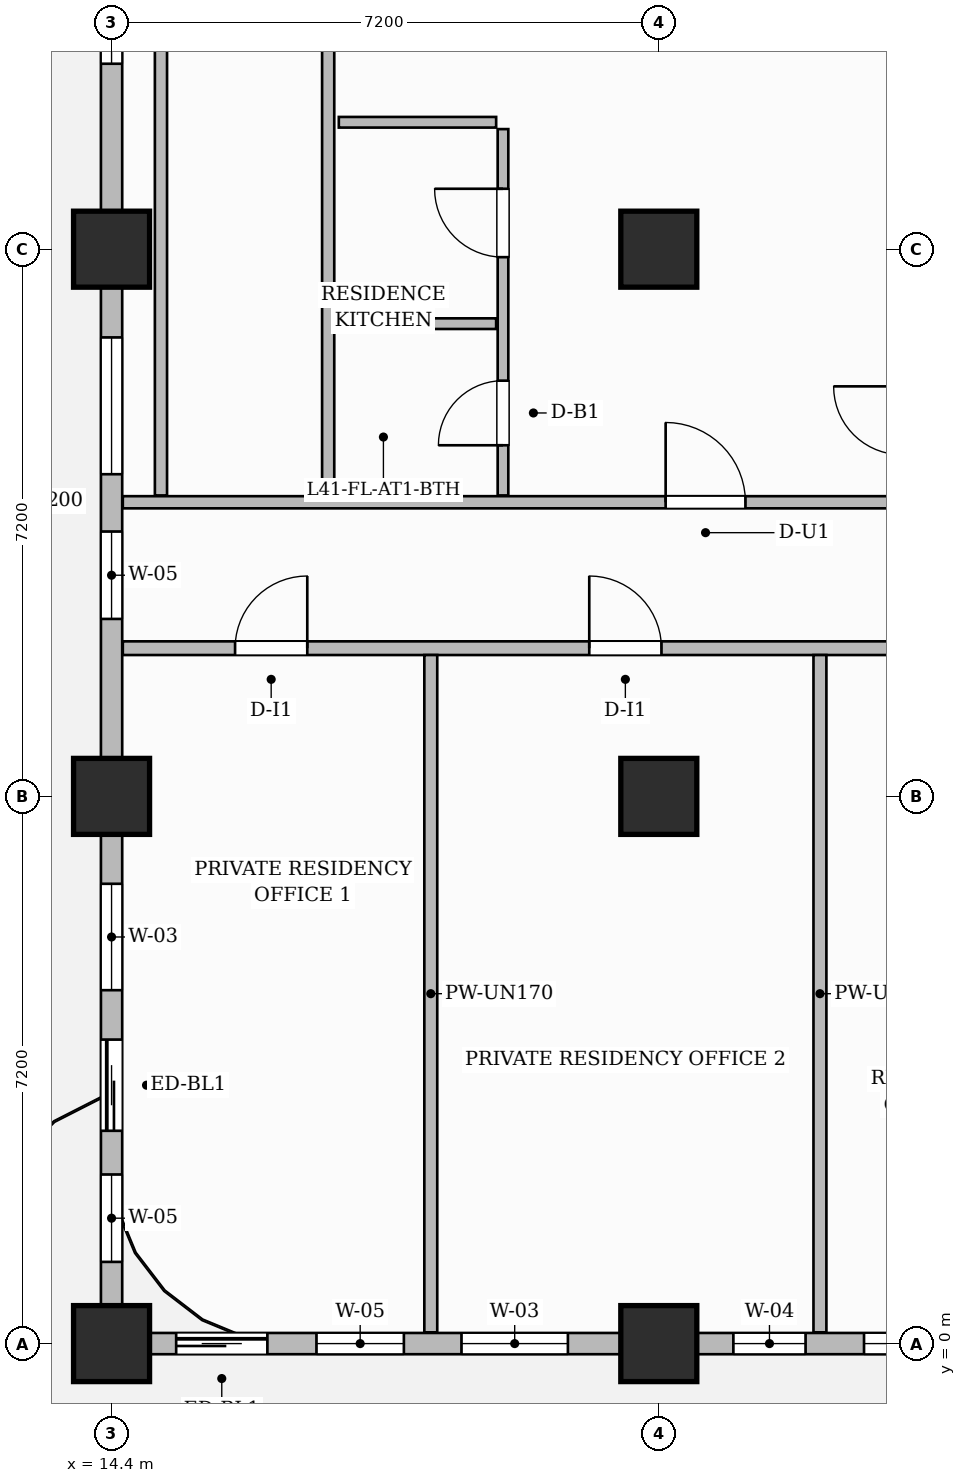
"""IFC4 building model, lengths in metres.
Left out: names, types, materials, properties, quantities, classifications, styles, units other than length and angle.
Written with IfcOpenShell. Run it as: python <this file> out.ifc"""

import sys

from ifc_helpers import new_model, si_unit, direction, frame, frame_2d, origin, origin_2d, place, context, subcontext, project, spatial, rectangle, extrude, source, transform, mapped, element, fill, save


model = new_model("IFC4")
c1 = context("Model", 3, precision=1e-05, world=origin(), true_north=direction((0.0, 1.0)))
c2 = subcontext(c1, "Body", "Model", "MODEL_VIEW")
j1 = project(units=[si_unit("LENGTHUNIT", "METRE"), si_unit("PLANEANGLEUNIT", "RADIAN")], contexts=[c1])
p1 = place(None, origin())
s1 = spatial("IfcSite", under=j1, at=p1, CompositionType="ELEMENT")
p2 = place(p1, origin())
s2 = spatial("IfcBuilding", under=s1, at=p2, CompositionType="ELEMENT")
p3 = place(p2, frame((0.0, 0.0, 165.7)))
s3 = spatial("IfcBuildingStorey", under=s2, at=p3, CompositionType="ELEMENT", Elevation=165.7)
m1 = source(origin(), c2, "Body", "SweptSolid", [
    extrude(rectangle(XDim=1.0, YDim=1.0, at=origin_2d()), origin(), (0.0, 0.0, 1.0), 3.85),
])
for number, where, z_axis, x_axis in (
    (1, (14.4, 0.0, 0.0), (0.0, 0.0, 1.0), (1.0, 0.0, 0.0)),
    (2, (14.4, 7.2, 0.0), (0.0, 0.0, 1.0), (1.0, 0.0, 0.0)),
    (3, (14.4, 14.4, 0.0), (0.0, 0.0, 1.0), (1.0, 0.0, 0.0)),
    (4, (21.6, 0.0, 0.0), (0.0, 0.0, 1.0), (1.0, 0.0, 0.0)),
    (5, (21.6, 7.2, 0.0), (0.0, 0.0, 1.0), (1.0, 0.0, 0.0)),
    (6, (21.6, 14.4, 0.0), (0.0, 0.0, 1.0), (1.0, 0.0, 0.0)),
):
    element("IfcColumn", number, at=place(p3, frame(where, z_axis=z_axis, x_axis=x_axis)), inside=s3, PredefinedType="COLUMN", context=c2, shape_type="MappedRepresentation", body=[
        mapped(m1, transform((0.0, 0.0, 0.0), scale=1.0)),
    ])
p4 = place(p3, frame((14.548, 9.15, 0.0), z_axis=(0.0, 0.0, 1.0), x_axis=(1.0, 0.0, 0.0)))
e7 = element("IfcWall", 7, at=p4, inside=s3, PredefinedType="PARTITIONING", context=c2, shape_type="SweptSolid", body=[
    extrude(rectangle(XDim=15.562, YDim=0.18, at=frame_2d((7.781, 0.0))), origin(), (0.0, 0.0, 1.0), 3.6),
])
p5 = place(p4, frame((1.477, 0.0, 0.0)))
e8 = element("IfcOpeningElement", 8, at=p5, cuts=e7, PredefinedType="OPENING", context=c2, shape_type="SweptSolid", body=[
    extrude(rectangle(XDim=0.95, YDim=2.15, at=frame_2d((0.475, 1.075))), frame((0.0, 0.1, 0.0), z_axis=(0.0, -1.0, 0.0), x_axis=(1.0, 0.0, 0.0)), (0.0, 0.0, 1.0), 0.2),
])
p6 = place(p4, frame((6.137, 0.0, 0.0)))
e9 = element("IfcOpeningElement", 9, at=p6, cuts=e7, PredefinedType="OPENING", context=c2, shape_type="SweptSolid", body=[
    extrude(rectangle(XDim=0.95, YDim=2.15, at=frame_2d((0.475, 1.075))), frame((0.0, 0.1, 0.0), z_axis=(0.0, -1.0, 0.0), x_axis=(1.0, 0.0, 0.0)), (0.0, 0.0, 1.0), 0.2),
])
p7 = place(p4, frame((10.177, 0.0, 0.0)))
e10 = element("IfcOpeningElement", 10, at=p7, cuts=e7, PredefinedType="OPENING", context=c2, shape_type="SweptSolid", body=[
    extrude(rectangle(XDim=0.95, YDim=2.15, at=frame_2d((0.475, 1.075))), frame((0.0, 0.1, 0.0), z_axis=(0.0, -1.0, 0.0), x_axis=(1.0, 0.0, 0.0)), (0.0, 0.0, 1.0), 0.2),
])
p8 = place(p4, frame((13.417, 0.0, 0.0)))
e11 = element("IfcOpeningElement", 11, at=p8, cuts=e7, PredefinedType="OPENING", context=c2, shape_type="SweptSolid", body=[
    extrude(rectangle(XDim=0.95, YDim=2.15, at=frame_2d((0.475, 1.075))), frame((0.0, 0.1, 0.0), z_axis=(0.0, -1.0, 0.0), x_axis=(1.0, 0.0, 0.0)), (0.0, 0.0, 1.0), 0.2),
])
p9 = place(p3, frame((14.548, 11.07, 0.0), z_axis=(0.0, 0.0, 1.0), x_axis=(1.0, 0.0, 0.0)))
e12 = element("IfcWall", 12, at=p9, inside=s3, PredefinedType="PARTITIONING", context=c2, shape_type="SweptSolid", body=[
    extrude(rectangle(XDim=15.562, YDim=0.16, at=frame_2d((7.781, 0.0))), origin(), (0.0, 0.0, 1.0), 3.6),
])
p10 = place(p9, frame((7.142, 0.0, 0.0)))
e13 = element("IfcOpeningElement", 13, at=p10, cuts=e12, PredefinedType="OPENING", context=c2, shape_type="SweptSolid", body=[
    extrude(rectangle(XDim=1.05, YDim=2.25, at=frame_2d((0.525, 1.125))), frame((0.0, 0.09, 0.0), z_axis=(0.0, -1.0, 0.0), x_axis=(1.0, 0.0, 0.0)), (0.0, 0.0, 1.0), 0.18),
])
for number, where, z_axis, x_axis in (
    (14, (18.6, 0.148, 0.0), (0.0, 0.0, 1.0), (0.0, 1.0, 0.0)),
    (15, (23.72, 0.148, 0.0), (0.0, 0.0, 1.0), (0.0, 1.0, 0.0)),
):
    element("IfcWall", number, at=place(p3, frame(where, z_axis=z_axis, x_axis=x_axis)), inside=s3, PredefinedType="PARTITIONING", context=c2, shape_type="SweptSolid", body=[
        extrude(rectangle(XDim=8.912, YDim=0.17, at=frame_2d((4.456, 0.0))), origin(), (0.0, 0.0, 1.0), 3.6),
    ])
for number, where, z_axis, x_axis in (
    (16, (15.05, 11.16, 0.0), (0.0, 0.0, 1.0), (0.0, 1.0, 0.0)),
    (17, (17.25, 11.16, 0.0), (0.0, 0.0, 1.0), (0.0, 1.0, 0.0)),
):
    element("IfcWall", number, at=place(p3, frame(where, z_axis=z_axis, x_axis=x_axis)), inside=s3, PredefinedType="PARTITIONING", context=c2, shape_type="SweptSolid", body=[
        extrude(rectangle(XDim=13.95, YDim=0.16, at=frame_2d((6.975, 0.0))), origin(), (0.0, 0.0, 1.0), 3.6),
    ])
p11 = place(p3, frame((19.55, 11.16, 0.0), z_axis=(0.0, 0.0, 1.0), x_axis=(0.0, 1.0, 0.0)))
e18 = element("IfcWall", 18, at=p11, inside=s3, PredefinedType="PARTITIONING", context=c2, shape_type="SweptSolid", body=[
    extrude(rectangle(XDim=4.82, YDim=0.14, at=frame_2d((2.41, 0.0))), origin(), (0.0, 0.0, 1.0), 3.6),
])
p12 = place(p11, frame((0.66, 0.0, 0.0)))
e19 = element("IfcOpeningElement", 19, at=p12, cuts=e18, PredefinedType="OPENING", context=c2, shape_type="SweptSolid", body=[
    extrude(rectangle(XDim=0.85, YDim=2.1, at=frame_2d((0.425, 1.05))), frame((0.0, 0.08, 0.0), z_axis=(0.0, -1.0, 0.0), x_axis=(1.0, 0.0, 0.0)), (0.0, 0.0, 1.0), 0.16),
])
p13 = place(p11, frame((3.135, 0.0, 0.0)))
e20 = element("IfcOpeningElement", 20, at=p13, cuts=e18, PredefinedType="OPENING", context=c2, shape_type="SweptSolid", body=[
    extrude(rectangle(XDim=0.9, YDim=2.15, at=frame_2d((0.45, 1.075))), frame((0.0, 0.08, 0.0), z_axis=(0.0, -1.0, 0.0), x_axis=(1.0, 0.0, 0.0)), (0.0, 0.0, 1.0), 0.16),
])
for number, where, z_axis, x_axis in (
    (21, (17.39, 13.42, 0.0), (0.0, 0.0, 1.0), (1.0, 0.0, 0.0)),
    (22, (17.39, 16.07, 0.0), (0.0, 0.0, 1.0), (1.0, 0.0, 0.0)),
):
    element("IfcWall", number, at=place(p3, frame(where, z_axis=z_axis, x_axis=x_axis)), inside=s3, PredefinedType="PARTITIONING", context=c2, shape_type="SweptSolid", body=[
        extrude(rectangle(XDim=2.07, YDim=0.14, at=frame_2d((1.035, 0.0))), origin(), (0.0, 0.0, 1.0), 3.6),
    ])
p14 = place(p3, frame((14.4, 0.0, 0.0), z_axis=(0.0, 0.0, 1.0), x_axis=(1.0, 0.0, 0.0)))
e23 = element("IfcWall", 23, at=p14, inside=s3, PredefinedType="SOLIDWALL", context=c2, shape_type="SweptSolid", body=[
    extrude(rectangle(XDim=35.4, YDim=0.28, at=frame_2d((17.7, 0.0))), origin(), (0.0, 0.0, 1.0), 3.085),
])
p15 = place(p14, frame((0.85, 0.0, 0.0)))
e24 = element("IfcOpeningElement", 24, at=p15, cuts=e23, PredefinedType="OPENING", context=c2, shape_type="SweptSolid", body=[
    extrude(rectangle(XDim=1.2, YDim=2.2, at=frame_2d((0.6, 1.1))), frame((0.0, 0.15, 0.0), z_axis=(0.0, -1.0, 0.0), x_axis=(1.0, 0.0, 0.0)), (0.0, 0.0, 1.0), 0.3),
])
p16 = place(p14, frame((2.696, 0.0, 0.8)))
e25 = element("IfcOpeningElement", 25, at=p16, cuts=e23, PredefinedType="OPENING", context=c2, shape_type="SweptSolid", body=[
    extrude(rectangle(XDim=1.15, YDim=1.8, at=frame_2d((0.575, 0.9))), frame((0.0, 0.15, 0.0), z_axis=(0.0, -1.0, 0.0), x_axis=(1.0, 0.0, 0.0)), (0.0, 0.0, 1.0), 0.3),
])
p17 = place(p14, frame((4.604, 0.0, 0.8)))
e26 = element("IfcOpeningElement", 26, at=p17, cuts=e23, PredefinedType="OPENING", context=c2, shape_type="SweptSolid", body=[
    extrude(rectangle(XDim=1.4, YDim=1.85, at=frame_2d((0.7, 0.925))), frame((0.0, 0.15, 0.0), z_axis=(0.0, -1.0, 0.0), x_axis=(1.0, 0.0, 0.0)), (0.0, 0.0, 1.0), 0.3),
])
p18 = place(p14, frame((8.181, 0.0, 0.8)))
e27 = element("IfcOpeningElement", 27, at=p18, cuts=e23, PredefinedType="OPENING", context=c2, shape_type="SweptSolid", body=[
    extrude(rectangle(XDim=0.95, YDim=1.75, at=frame_2d((0.475, 0.875))), frame((0.0, 0.15, 0.0), z_axis=(0.0, -1.0, 0.0), x_axis=(1.0, 0.0, 0.0)), (0.0, 0.0, 1.0), 0.3),
])
p19 = place(p14, frame((9.9, 0.0, 0.8)))
e28 = element("IfcOpeningElement", 28, at=p19, cuts=e23, PredefinedType="OPENING", context=c2, shape_type="SweptSolid", body=[
    extrude(rectangle(XDim=1.8, YDim=1.85, at=frame_2d((0.9, 0.925))), frame((0.0, 0.15, 0.0), z_axis=(0.0, -1.0, 0.0), x_axis=(1.0, 0.0, 0.0)), (0.0, 0.0, 1.0), 0.3),
])
p20 = place(p14, frame((12.469, 0.0, 0.8)))
e29 = element("IfcOpeningElement", 29, at=p20, cuts=e23, PredefinedType="OPENING", context=c2, shape_type="SweptSolid", body=[
    extrude(rectangle(XDim=0.95, YDim=1.75, at=frame_2d((0.475, 0.875))), frame((0.0, 0.15, 0.0), z_axis=(0.0, -1.0, 0.0), x_axis=(1.0, 0.0, 0.0)), (0.0, 0.0, 1.0), 0.3),
])
p21 = place(p14, frame((16.804, 0.0, 0.8)))
e30 = element("IfcOpeningElement", 30, at=p21, cuts=e23, PredefinedType="OPENING", context=c2, shape_type="SweptSolid", body=[
    extrude(rectangle(XDim=1.8, YDim=1.85, at=frame_2d((0.9, 0.925))), frame((0.0, 0.15, 0.0), z_axis=(0.0, -1.0, 0.0), x_axis=(1.0, 0.0, 0.0)), (0.0, 0.0, 1.0), 0.3),
])
p22 = place(p14, frame((21.521, 0.0, 0.8)))
e31 = element("IfcOpeningElement", 31, at=p22, cuts=e23, PredefinedType="OPENING", context=c2, shape_type="SweptSolid", body=[
    extrude(rectangle(XDim=0.95, YDim=1.75, at=frame_2d((0.475, 0.875))), frame((0.0, 0.15, 0.0), z_axis=(0.0, -1.0, 0.0), x_axis=(1.0, 0.0, 0.0)), (0.0, 0.0, 1.0), 0.3),
])
p23 = place(p14, frame((23.904, 0.0, 0.8)))
e32 = element("IfcOpeningElement", 32, at=p23, cuts=e23, PredefinedType="OPENING", context=c2, shape_type="SweptSolid", body=[
    extrude(rectangle(XDim=1.8, YDim=1.85, at=frame_2d((0.9, 0.925))), frame((0.0, 0.15, 0.0), z_axis=(0.0, -1.0, 0.0), x_axis=(1.0, 0.0, 0.0)), (0.0, 0.0, 1.0), 0.3),
])
p24 = place(p14, frame((29.681, 0.0, 0.8)))
e33 = element("IfcOpeningElement", 33, at=p24, cuts=e23, PredefinedType="OPENING", context=c2, shape_type="SweptSolid", body=[
    extrude(rectangle(XDim=1.8, YDim=1.85, at=frame_2d((0.9, 0.925))), frame((0.0, 0.15, 0.0), z_axis=(0.0, -1.0, 0.0), x_axis=(1.0, 0.0, 0.0)), (0.0, 0.0, 1.0), 0.3),
])
p25 = place(p14, frame((32.327, 0.0, 0.8)))
e34 = element("IfcOpeningElement", 34, at=p25, cuts=e23, PredefinedType="OPENING", context=c2, shape_type="SweptSolid", body=[
    extrude(rectangle(XDim=1.8, YDim=1.85, at=frame_2d((0.9, 0.925))), frame((0.0, 0.15, 0.0), z_axis=(0.0, -1.0, 0.0), x_axis=(1.0, 0.0, 0.0)), (0.0, 0.0, 1.0), 0.3),
])
p26 = place(p3, frame((14.4, 0.05, 0.0), z_axis=(0.0, 0.0, 1.0), x_axis=(0.0, 1.0, 0.0)))
e35 = element("IfcWall", 35, at=p26, inside=s3, PredefinedType="SOLIDWALL", context=c2, shape_type="SweptSolid", body=[
    extrude(rectangle(XDim=20.6, YDim=0.28, at=frame_2d((10.3, 0.0))), origin(), (0.0, 0.0, 1.0), 3.085),
])
p27 = place(p26, frame((2.75, 0.0, 0.0)))
e36 = element("IfcOpeningElement", 36, at=p27, cuts=e35, PredefinedType="OPENING", context=c2, shape_type="SweptSolid", body=[
    extrude(rectangle(XDim=1.2, YDim=2.2, at=frame_2d((0.6, 1.1))), frame((0.0, 0.15, 0.0), z_axis=(0.0, -1.0, 0.0), x_axis=(1.0, 0.0, 0.0)), (0.0, 0.0, 1.0), 0.3),
])
p28 = place(p26, frame((1.025, 0.0, 0.8)))
e37 = element("IfcOpeningElement", 37, at=p28, cuts=e35, PredefinedType="OPENING", context=c2, shape_type="SweptSolid", body=[
    extrude(rectangle(XDim=1.15, YDim=1.8, at=frame_2d((0.575, 0.9))), frame((0.0, 0.15, 0.0), z_axis=(0.0, -1.0, 0.0), x_axis=(1.0, 0.0, 0.0)), (0.0, 0.0, 1.0), 0.3),
])
p29 = place(p26, frame((4.6, 0.0, 0.8)))
e38 = element("IfcOpeningElement", 38, at=p29, cuts=e35, PredefinedType="OPENING", context=c2, shape_type="SweptSolid", body=[
    extrude(rectangle(XDim=1.4, YDim=1.85, at=frame_2d((0.7, 0.925))), frame((0.0, 0.15, 0.0), z_axis=(0.0, -1.0, 0.0), x_axis=(1.0, 0.0, 0.0)), (0.0, 0.0, 1.0), 0.3),
])
p30 = place(p26, frame((9.485, 0.0, 0.8)))
e39 = element("IfcOpeningElement", 39, at=p30, cuts=e35, PredefinedType="OPENING", context=c2, shape_type="SweptSolid", body=[
    extrude(rectangle(XDim=1.15, YDim=1.8, at=frame_2d((0.575, 0.9))), frame((0.0, 0.15, 0.0), z_axis=(0.0, -1.0, 0.0), x_axis=(1.0, 0.0, 0.0)), (0.0, 0.0, 1.0), 0.3),
])
p31 = place(p26, frame((11.389, 0.0, 0.8)))
e40 = element("IfcOpeningElement", 40, at=p31, cuts=e35, PredefinedType="OPENING", context=c2, shape_type="SweptSolid", body=[
    extrude(rectangle(XDim=1.8, YDim=1.85, at=frame_2d((0.9, 0.925))), frame((0.0, 0.15, 0.0), z_axis=(0.0, -1.0, 0.0), x_axis=(1.0, 0.0, 0.0)), (0.0, 0.0, 1.0), 0.3),
])
p32 = place(p26, frame((16.79, 0.0, 0.8)))
e41 = element("IfcOpeningElement", 41, at=p32, cuts=e35, PredefinedType="OPENING", context=c2, shape_type="SweptSolid", body=[
    extrude(rectangle(XDim=1.8, YDim=1.85, at=frame_2d((0.9, 0.925))), frame((0.0, 0.15, 0.0), z_axis=(0.0, -1.0, 0.0), x_axis=(1.0, 0.0, 0.0)), (0.0, 0.0, 1.0), 0.3),
])
m2 = source(origin(), c2, "Body", "SweptSolid", [
    extrude(rectangle(XDim=0.95, YDim=2.15, at=frame_2d((0.475, 1.075))), frame((0.0, 0.025, 0.0), z_axis=(0.0, -1.0, 0.0), x_axis=(1.0, 0.0, 0.0)), (0.0, 0.0, 1.0), 0.05),
])
p33 = place(p5, origin())
e42 = element("IfcDoor", 42, at=p33, inside=s3, OperationType="SINGLE_SWING_RIGHT", PredefinedType="DOOR", context=c2, shape_type="MappedRepresentation", body=[
    mapped(m2, transform((0.0, 0.0, 0.0), scale=1.0)),
])
fill(e8, e42)
p34 = place(p6, origin())
e43 = element("IfcDoor", 43, at=p34, inside=s3, OperationType="SINGLE_SWING_LEFT", PredefinedType="DOOR", context=c2, shape_type="MappedRepresentation", body=[
    mapped(m2, transform((0.0, 0.0, 0.0), scale=1.0)),
])
fill(e9, e43)
m3 = source(origin(), c2, "Body", "SweptSolid", [
    extrude(rectangle(XDim=0.85, YDim=2.1, at=frame_2d((0.425, 1.05))), frame((0.0, 0.025, 0.0), z_axis=(0.0, -1.0, 0.0), x_axis=(1.0, 0.0, 0.0)), (0.0, 0.0, 1.0), 0.05),
])
p35 = place(p12, origin())
e44 = element("IfcDoor", 44, at=p35, inside=s3, OperationType="SINGLE_SWING_LEFT", PredefinedType="DOOR", context=c2, shape_type="MappedRepresentation", body=[
    mapped(m3, transform((0.0, 0.0, 0.0), scale=1.0)),
])
fill(e19, e44)
m4 = source(origin(), c2, "Body", "SweptSolid", [
    extrude(rectangle(XDim=0.9, YDim=2.15, at=frame_2d((0.45, 1.075))), frame((0.0, 0.025, 0.0), z_axis=(0.0, -1.0, 0.0), x_axis=(1.0, 0.0, 0.0)), (0.0, 0.0, 1.0), 0.05),
])
p36 = place(p13, origin())
e45 = element("IfcDoor", 45, at=p36, inside=s3, OperationType="SINGLE_SWING_RIGHT", PredefinedType="DOOR", context=c2, shape_type="MappedRepresentation", body=[
    mapped(m4, transform((0.0, 0.0, 0.0), scale=1.0)),
])
fill(e20, e45)
m5 = source(origin(), c2, "Body", "SweptSolid", [
    extrude(rectangle(XDim=1.05, YDim=2.25, at=frame_2d((0.525, 1.125))), frame((0.0, 0.025, 0.0), z_axis=(0.0, -1.0, 0.0), x_axis=(1.0, 0.0, 0.0)), (0.0, 0.0, 1.0), 0.05),
])
p37 = place(p10, origin())
e46 = element("IfcDoor", 46, at=p37, inside=s3, OperationType="SINGLE_SWING_LEFT", PredefinedType="DOOR", context=c2, shape_type="MappedRepresentation", body=[
    mapped(m5, transform((0.0, 0.0, 0.0), scale=1.0)),
])
fill(e13, e46)
m6 = source(origin(), c2, "Body", "SweptSolid", [
    extrude(rectangle(XDim=1.2, YDim=2.2, at=frame_2d((0.6, 1.1))), frame((0.0, 0.025, 0.0), z_axis=(0.0, -1.0, 0.0), x_axis=(1.0, 0.0, 0.0)), (0.0, 0.0, 1.0), 0.05),
])
p38 = place(p15, origin())
e47 = element("IfcDoor", 47, at=p38, inside=s3, OperationType="SLIDING_TO_LEFT", PredefinedType="DOOR", context=c2, shape_type="MappedRepresentation", body=[
    mapped(m6, transform((0.0, 0.0, 0.0), scale=1.0)),
])
fill(e24, e47)
p39 = place(p27, origin())
e48 = element("IfcDoor", 48, at=p39, inside=s3, OperationType="SLIDING_TO_LEFT", PredefinedType="DOOR", context=c2, shape_type="MappedRepresentation", body=[
    mapped(m6, transform((0.0, 0.0, 0.0), scale=1.0)),
])
fill(e36, e48)
m7 = source(origin(), c2, "Body", "SweptSolid", [
    extrude(rectangle(XDim=1.15, YDim=1.8, at=frame_2d((0.575, 0.9))), frame((0.0, 0.03, 0.0), z_axis=(0.0, -1.0, 0.0), x_axis=(1.0, 0.0, 0.0)), (0.0, 0.0, 1.0), 0.06),
])
p40 = place(p16, origin())
e49 = element("IfcWindow", 49, at=p40, inside=s3, PartitioningType="SINGLE_PANEL", PredefinedType="WINDOW", context=c2, shape_type="MappedRepresentation", body=[
    mapped(m7, transform((0.0, 0.0, 0.0), scale=1.0)),
])
fill(e25, e49)
m8 = source(origin(), c2, "Body", "SweptSolid", [
    extrude(rectangle(XDim=1.4, YDim=1.85, at=frame_2d((0.7, 0.925))), frame((0.0, 0.03, 0.0), z_axis=(0.0, -1.0, 0.0), x_axis=(1.0, 0.0, 0.0)), (0.0, 0.0, 1.0), 0.06),
])
p41 = place(p17, origin())
e50 = element("IfcWindow", 50, at=p41, inside=s3, PartitioningType="SINGLE_PANEL", PredefinedType="WINDOW", context=c2, shape_type="MappedRepresentation", body=[
    mapped(m8, transform((0.0, 0.0, 0.0), scale=1.0)),
])
fill(e26, e50)
m9 = source(origin(), c2, "Body", "SweptSolid", [
    extrude(rectangle(XDim=0.95, YDim=1.75, at=frame_2d((0.475, 0.875))), frame((0.0, 0.03, 0.0), z_axis=(0.0, -1.0, 0.0), x_axis=(1.0, 0.0, 0.0)), (0.0, 0.0, 1.0), 0.06),
])
p42 = place(p18, origin())
e51 = element("IfcWindow", 51, at=p42, inside=s3, PartitioningType="SINGLE_PANEL", PredefinedType="WINDOW", context=c2, shape_type="MappedRepresentation", body=[
    mapped(m9, transform((0.0, 0.0, 0.0), scale=1.0)),
])
fill(e27, e51)
m10 = source(origin(), c2, "Body", "SweptSolid", [
    extrude(rectangle(XDim=1.8, YDim=1.85, at=frame_2d((0.9, 0.925))), frame((0.0, 0.03, 0.0), z_axis=(0.0, -1.0, 0.0), x_axis=(1.0, 0.0, 0.0)), (0.0, 0.0, 1.0), 0.06),
])
p43 = place(p19, origin())
e52 = element("IfcWindow", 52, at=p43, inside=s3, PartitioningType="DOUBLE_PANEL_VERTICAL", PredefinedType="WINDOW", context=c2, shape_type="MappedRepresentation", body=[
    mapped(m10, transform((0.0, 0.0, 0.0), scale=1.0)),
])
fill(e28, e52)
p44 = place(p28, origin())
e53 = element("IfcWindow", 53, at=p44, inside=s3, PartitioningType="SINGLE_PANEL", PredefinedType="WINDOW", context=c2, shape_type="MappedRepresentation", body=[
    mapped(m7, transform((0.0, 0.0, 0.0), scale=1.0)),
])
fill(e37, e53)
p45 = place(p29, origin())
e54 = element("IfcWindow", 54, at=p45, inside=s3, PartitioningType="SINGLE_PANEL", PredefinedType="WINDOW", context=c2, shape_type="MappedRepresentation", body=[
    mapped(m8, transform((0.0, 0.0, 0.0), scale=1.0)),
])
fill(e38, e54)
p46 = place(p30, origin())
e55 = element("IfcWindow", 55, at=p46, inside=s3, PartitioningType="SINGLE_PANEL", PredefinedType="WINDOW", context=c2, shape_type="MappedRepresentation", body=[
    mapped(m7, transform((0.0, 0.0, 0.0), scale=1.0)),
])
fill(e39, e55)
p47 = place(p31, origin())
e56 = element("IfcWindow", 56, at=p47, inside=s3, PartitioningType="DOUBLE_PANEL_VERTICAL", PredefinedType="WINDOW", context=c2, shape_type="MappedRepresentation", body=[
    mapped(m10, transform((0.0, 0.0, 0.0), scale=1.0)),
])
fill(e40, e56)
p48 = place(p32, origin())
e57 = element("IfcWindow", 57, at=p48, inside=s3, PartitioningType="DOUBLE_PANEL_VERTICAL", PredefinedType="WINDOW", context=c2, shape_type="MappedRepresentation", body=[
    mapped(m10, transform((0.0, 0.0, 0.0), scale=1.0)),
])
fill(e41, e57)
save(model, sys.argv[1])
